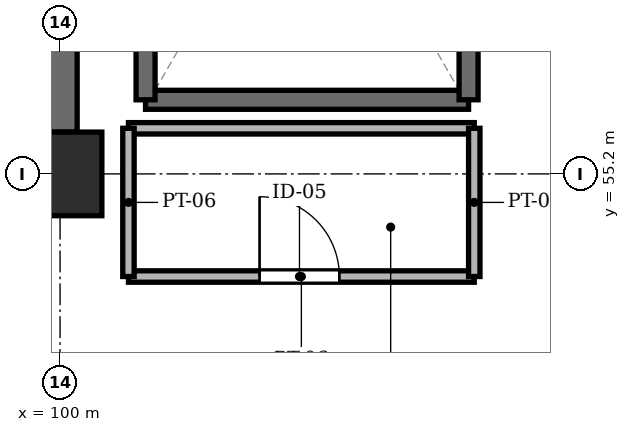
"""IFC4 building model, lengths in metres.
Left out: names, types, materials, properties, quantities, classifications, styles, units other than length and angle.
Written with IfcOpenShell. Run it as: python <this file> out.ifc"""

import sys

from ifc_helpers import new_model, si_unit, direction, frame, frame_2d, origin, origin_2d, place, context, subcontext, project, spatial, rectangle, extrude, element, fill, save


model = new_model("IFC4")
c1 = context("Model", 3, precision=1e-05, world=origin(), true_north=direction((0.0, 1.0)))
c2 = subcontext(c1, "Body", "Model", "MODEL_VIEW")
j1 = project(units=[si_unit("LENGTHUNIT", "METRE"), si_unit("PLANEANGLEUNIT", "RADIAN")], contexts=[c1])
p1 = place(None, origin())
s1 = spatial("IfcSite", under=j1, at=p1, CompositionType="ELEMENT")
p2 = place(p1, origin())
s2 = spatial("IfcBuilding", under=s1, at=p2, CompositionType="ELEMENT")
p3 = place(p2, frame((0.0, 0.0, 24.15)))
s3 = spatial("IfcBuildingStorey", under=s2, at=p3, CompositionType="ELEMENT", Elevation=24.15)
p4 = place(p3, frame((100.0, 55.2, -0.5), z_axis=(0.0, 0.0, 1.0), x_axis=(1.0, 0.0, 0.0)))
e1 = element("IfcColumn", 1, at=p4, inside=s3, PredefinedType="COLUMN", context=c2, shape_type="SweptSolid", body=[
    extrude(rectangle(XDim=1.1, YDim=1.1, at=origin_2d()), origin(), (0.0, 0.0, 1.0), 3.64),
])
p5 = place(p3, frame((100.0, 55.75, 0.0), z_axis=(0.0, 0.0, 1.0), x_axis=(0.0, 1.0, 0.0)))
e2 = element("IfcWall", 2, at=p5, inside=s3, PredefinedType="SHEAR", context=c2, shape_type="SweptSolid", body=[
    extrude(rectangle(XDim=6.2, YDim=0.45, at=frame_2d((3.1, 0.0))), origin(), (0.0, 0.0, 1.0), 3.14),
])
p6 = place(p3, frame((101.125, 56.175, 0.0), z_axis=(0.0, 0.0, 1.0), x_axis=(1.0, 0.0, 0.0)))
e3 = element("IfcWall", 3, at=p6, inside=s3, PredefinedType="SHEAR", context=c2, shape_type="SweptSolid", body=[
    extrude(rectangle(XDim=4.25, YDim=0.25, at=frame_2d((2.125, 0.0))), origin(), (0.0, 0.0, 1.0), 3.14),
])
for number, where, z_axis, x_axis in (
    (4, (101.125, 63.375, 0.0), (0.0, 0.0, 1.0), (0.0, -1.0, 0.0)),
    (5, (105.375, 56.175, 0.0), (0.0, 0.0, 1.0), (0.0, 1.0, 0.0)),
):
    element("IfcWall", number, at=place(p3, frame(where, z_axis=z_axis, x_axis=x_axis)), inside=s3, PredefinedType="SHEAR", context=c2, shape_type="SweptSolid", body=[
        extrude(rectangle(XDim=7.2, YDim=0.25, at=frame_2d((3.6, 0.0))), origin(), (0.0, 0.0, 1.0), 3.14),
    ])
p7 = place(p3, frame((100.9, 53.85, 0.0), z_axis=(0.0, 0.0, 1.0), x_axis=(1.0, 0.0, 0.0)))
e6 = element("IfcWall", 6, at=p7, inside=s3, PredefinedType="PARTITIONING", context=c2, shape_type="SweptSolid", body=[
    extrude(rectangle(XDim=4.55, YDim=0.15, at=frame_2d((2.275, 0.0))), origin(), (0.0, 0.0, 1.0), 2.68),
])
p8 = place(p7, frame((1.725, 0.0, 0.0)))
e7 = element("IfcOpeningElement", 7, at=p8, cuts=e6, PredefinedType="OPENING", context=c2, shape_type="SweptSolid", body=[
    extrude(rectangle(XDim=1.05, YDim=2.15, at=frame_2d((0.525, 1.075))), frame((0.0, 0.087, 0.0), z_axis=(0.0, -1.0, 0.0), x_axis=(1.0, 0.0, 0.0)), (0.0, 0.0, 1.0), 0.174),
])
p9 = place(p3, frame((100.9, 55.8, 0.0), z_axis=(0.0, 0.0, 1.0), x_axis=(1.0, 0.0, 0.0)))
e8 = element("IfcWall", 8, at=p9, inside=s3, PredefinedType="PARTITIONING", context=c2, shape_type="SweptSolid", body=[
    extrude(rectangle(XDim=4.55, YDim=0.15, at=frame_2d((2.275, 0.0))), origin(), (0.0, 0.0, 1.0), 2.68),
])
for number, where, z_axis, x_axis in (
    (9, (100.9, 53.85, 0.0), (0.0, 0.0, 1.0), (0.0, 1.0, 0.0)),
    (10, (105.45, 53.85, 0.0), (0.0, 0.0, 1.0), (0.0, 1.0, 0.0)),
):
    element("IfcWall", number, at=place(p3, frame(where, z_axis=z_axis, x_axis=x_axis)), inside=s3, PredefinedType="PARTITIONING", context=c2, shape_type="SweptSolid", body=[
        extrude(rectangle(XDim=1.95, YDim=0.15, at=frame_2d((0.975, 0.0))), origin(), (0.0, 0.0, 1.0), 2.68),
    ])
p10 = place(p8, origin())
e11 = element("IfcDoor", 11, at=p10, inside=s3, OperationType="SINGLE_SWING_LEFT", PredefinedType="DOOR", context=c2, shape_type="SweptSolid", body=[
    extrude(rectangle(XDim=1.05, YDim=2.15, at=frame_2d((0.525, 1.075))), frame((0.0, 0.025, 0.0), z_axis=(0.0, -1.0, 0.0), x_axis=(1.0, 0.0, 0.0)), (0.0, 0.0, 1.0), 0.05),
])
fill(e7, e11)
save(model, sys.argv[1])
